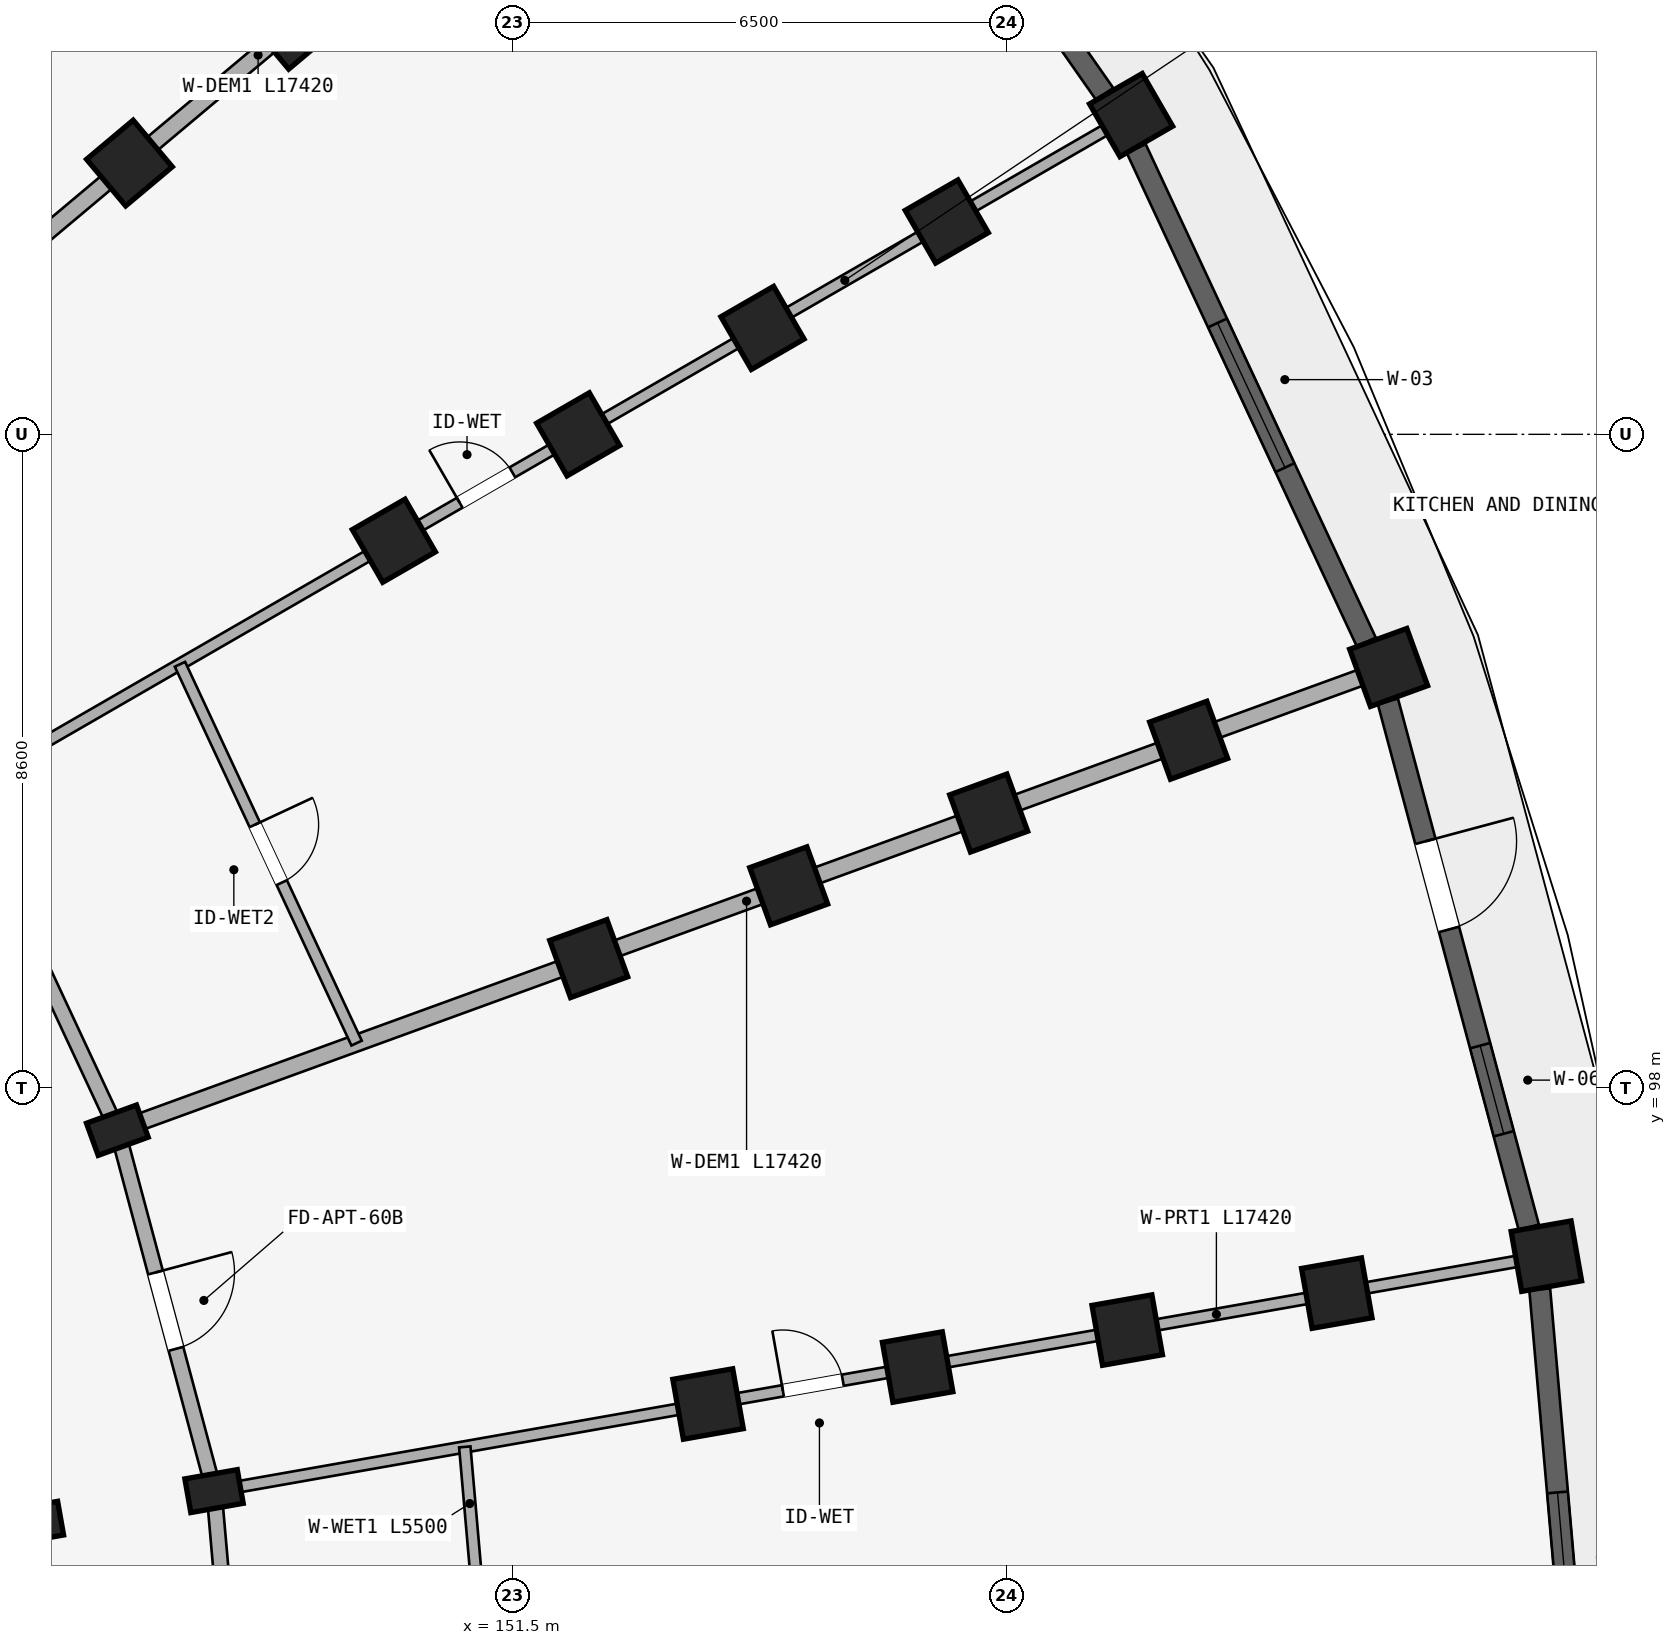
"""IFC4 building model, lengths in metres.
Left out: names, types, materials, properties, quantities, classifications, styles, units other than length and angle.
Written with IfcOpenShell. Run it as: python <this file> out.ifc"""

import sys

from ifc_helpers import new_model, si_unit, direction, frame, frame_2d, origin, origin_2d, place, context, subcontext, project, spatial, rectangle, extrude, element, fill, save


model = new_model("IFC4")
c1 = context("Model", 3, precision=1e-05, world=origin(), true_north=direction((0.0, 1.0)))
c2 = subcontext(c1, "Body", "Model", "MODEL_VIEW")
j1 = project(units=[si_unit("LENGTHUNIT", "METRE"), si_unit("PLANEANGLEUNIT", "RADIAN")], contexts=[c1])
p1 = place(None, origin())
s1 = spatial("IfcSite", under=j1, at=p1, CompositionType="ELEMENT")
p2 = place(p1, origin())
s2 = spatial("IfcBuilding", under=s1, at=p2, CompositionType="ELEMENT")
p3 = place(p2, frame((0.0, 0.0, 15.0)))
s3 = spatial("IfcBuildingStorey", under=s2, at=p3, CompositionType="ELEMENT", Elevation=15.0)
for number, where, z_axis, x_axis in (
    (1, (146.458, 110.169, 0.0), (0.0, 0.0, 1.0), (-0.643, 0.766, 0.0)),
    (2, (148.603, 111.969, 0.0), (0.0, 0.0, 1.0), (-0.643, 0.766, 0.0)),
    (3, (149.938, 105.2, 0.0), (0.0, 0.0, 1.0), (-0.5, 0.866, 0.0)),
    (4, (152.363, 106.6, 0.0), (0.0, 0.0, 1.0), (-0.5, 0.866, 0.0)),
    (5, (154.787, 108.0, 0.0), (0.0, 0.0, 1.0), (-0.5, 0.866, 0.0)),
    (6, (157.212, 109.4, 0.0), (0.0, 0.0, 1.0), (-0.5, 0.866, 0.0)),
    (7, (159.637, 110.8, 0.0), (0.0, 0.0, 1.0), (-0.5, 0.866, 0.0)),
):
    element("IfcColumn", number, at=place(p3, frame(where, z_axis=z_axis, x_axis=x_axis)), inside=s3, PredefinedType="COLUMN", context=c2, shape_type="SweptSolid", body=[
        extrude(rectangle(XDim=0.8, YDim=0.8, at=origin_2d()), origin(), (0.0, 0.0, 1.0), 2.93),
    ])
p4 = place(p3, frame((146.299, 97.445, 0.0), z_axis=(0.0, 0.0, 1.0), x_axis=(-0.342020143326, 0.939692620786, 0.0)))
e8 = element("IfcColumn", 8, at=p4, inside=s3, PredefinedType="COLUMN", context=c2, shape_type="SweptSolid", body=[
    extrude(rectangle(XDim=0.45, YDim=0.7, at=origin_2d()), origin(), (0.0, 0.0, 1.0), 2.93),
])
for number, where, z_axis, x_axis in (
    (9, (152.501, 99.702, 0.0), (0.0, 0.0, 1.0), (-0.342, 0.94, 0.0)),
    (10, (155.132, 100.66, 0.0), (0.0, 0.0, 1.0), (-0.342, 0.94, 0.0)),
    (11, (157.764, 101.618, 0.0), (0.0, 0.0, 1.0), (-0.342, 0.94, 0.0)),
    (12, (160.395, 102.575, 0.0), (0.0, 0.0, 1.0), (-0.342, 0.94, 0.0)),
    (13, (163.026, 103.533, 0.0), (0.0, 0.0, 1.0), (-0.342, 0.94, 0.0)),
):
    element("IfcColumn", number, at=place(p3, frame(where, z_axis=z_axis, x_axis=x_axis)), inside=s3, PredefinedType="COLUMN", context=c2, shape_type="SweptSolid", body=[
        extrude(rectangle(XDim=0.8, YDim=0.8, at=origin_2d()), origin(), (0.0, 0.0, 1.0), 2.93),
    ])
for number, where, z_axis, x_axis in (
    (14, (145.208, 92.28, 0.0), (0.0, 0.0, 1.0), (-0.174, 0.985, 0.0)),
    (15, (147.572, 92.697, 0.0), (0.0, 0.0, 1.0), (-0.174, 0.985, 0.0)),
):
    element("IfcColumn", number, at=place(p3, frame(where, z_axis=z_axis, x_axis=x_axis)), inside=s3, PredefinedType="COLUMN", context=c2, shape_type="SweptSolid", body=[
        extrude(rectangle(XDim=0.45, YDim=0.7, at=origin_2d()), origin(), (0.0, 0.0, 1.0), 2.93),
    ])
for number, where, z_axis, x_axis in (
    (16, (154.071, 93.843, 0.0), (0.0, 0.0, 1.0), (-0.174, 0.985, 0.0)),
    (17, (156.829, 94.329, 0.0), (0.0, 0.0, 1.0), (-0.174, 0.985, 0.0)),
    (18, (159.586, 94.815, 0.0), (0.0, 0.0, 1.0), (-0.174, 0.985, 0.0)),
    (19, (162.344, 95.302, 0.0), (0.0, 0.0, 1.0), (-0.174, 0.985, 0.0)),
    (20, (165.101, 95.788, 0.0), (0.0, 0.0, 1.0), (-0.174, 0.985, 0.0)),
):
    element("IfcColumn", number, at=place(p3, frame(where, z_axis=z_axis, x_axis=x_axis)), inside=s3, PredefinedType="COLUMN", context=c2, shape_type="SweptSolid", body=[
        extrude(rectangle(XDim=0.8, YDim=0.8, at=origin_2d()), origin(), (0.0, 0.0, 1.0), 2.93),
    ])
p5 = place(p3, frame((144.222, 101.9, 0.0), z_axis=(0.0, 0.0, 1.0), x_axis=(0.422629854778, -0.906302381024, 0.0)))
e21 = element("IfcWall", 21, at=p5, inside=s3, PredefinedType="STANDARD", context=c2, shape_type="SweptSolid", body=[
    extrude(rectangle(XDim=4.915, YDim=0.2, at=frame_2d((2.458, 0.0))), origin(), (0.0, 0.0, 1.0), 2.372),
])
p6 = place(p3, frame((146.299, 97.445, 0.0), z_axis=(0.0, 0.0, 1.0), x_axis=(0.258803112091, -0.965930095386, 0.0)))
e22 = element("IfcWall", 22, at=p6, inside=s3, PredefinedType="STANDARD", context=c2, shape_type="SweptSolid", body=[
    extrude(rectangle(XDim=4.916, YDim=0.2, at=frame_2d((2.458, 0.0))), origin(), (0.0, 0.0, 1.0), 2.372),
])
p7 = place(p6, frame((1.938, 0.0, 0.0)))
e23 = element("IfcOpeningElement", 23, at=p7, cuts=e22, PredefinedType="OPENING", context=c2, shape_type="SweptSolid", body=[
    extrude(rectangle(XDim=1.04, YDim=2.15, at=frame_2d((0.52, 1.075))), frame((0.0, 0.11, 0.0), z_axis=(0.0, -1.0, 0.0), x_axis=(1.0, 0.0, 0.0)), (0.0, 0.0, 1.0), 0.22),
])
p8 = place(p3, frame((145.208, 92.28, 0.0), z_axis=(0.0, 0.0, 1.0), x_axis=(0.087187153726, -0.996191949488, 0.0)))
e24 = element("IfcWall", 24, at=p8, inside=s3, PredefinedType="STANDARD", context=c2, shape_type="SweptSolid", body=[
    extrude(rectangle(XDim=4.497, YDim=0.2, at=frame_2d((2.249, 0.0))), origin(), (0.0, 0.0, 1.0), 2.372),
])
p9 = place(p3, frame((147.572, 92.697, 0.0), z_axis=(0.0, 0.0, 1.0), x_axis=(0.087167566415, -0.996193663584, 0.0)))
e25 = element("IfcWall", 25, at=p9, inside=s3, PredefinedType="STANDARD", context=c2, shape_type="SweptSolid", body=[
    extrude(rectangle(XDim=4.916, YDim=0.2, at=frame_2d((2.458, 0.0))), origin(), (0.0, 0.0, 1.0), 2.372),
])
p10 = place(p3, frame((137.991, 109.479, 0.0), z_axis=(0.0, 0.0, 1.0), x_axis=(0.642784757967, 0.766046835987, 0.0)))
e26 = element("IfcWall", 26, at=p10, inside=s3, PredefinedType="PARTITIONING", context=c2, shape_type="SweptSolid", body=[
    extrude(rectangle(XDim=17.42, YDim=0.15, at=frame_2d((8.71, 0.0))), origin(), (0.0, 0.0, 1.0), 2.372),
])
p11 = place(p10, frame((7.5, 0.0, 0.0)))
e27 = element("IfcOpeningElement", 27, at=p11, cuts=e26, PredefinedType="OPENING", context=c2, shape_type="SweptSolid", body=[
    extrude(rectangle(XDim=0.8, YDim=2.1, at=frame_2d((0.4, 1.05))), frame((0.0, 0.085, 0.0), z_axis=(0.0, -1.0, 0.0), x_axis=(1.0, 0.0, 0.0)), (0.0, 0.0, 1.0), 0.17),
])
p12 = place(p3, frame((141.479, 105.991, 0.0), z_axis=(0.0, 0.0, 1.0), x_axis=(0.766046835987, 0.642784757967, 0.0)))
e28 = element("IfcWall", 28, at=p12, inside=s3, PredefinedType="STANDARD", context=c2, shape_type="SweptSolid", body=[
    extrude(rectangle(XDim=17.42, YDim=0.22, at=frame_2d((8.71, 0.0))), origin(), (0.0, 0.0, 1.0), 2.372),
])
p13 = place(p3, frame((144.309, 101.95, 0.0), z_axis=(0.0, 0.0, 1.0), x_axis=(0.866026648973, 0.499997843263, 0.0)))
e29 = element("IfcWall", 29, at=p13, inside=s3, PredefinedType="PARTITIONING", context=c2, shape_type="SweptSolid", body=[
    extrude(rectangle(XDim=17.42, YDim=0.15, at=frame_2d((8.71, 0.0))), origin(), (0.0, 0.0, 1.0), 2.372),
])
p14 = place(p13, frame((7.5, 0.0, 0.0)))
e30 = element("IfcOpeningElement", 30, at=p14, cuts=e29, PredefinedType="OPENING", context=c2, shape_type="SweptSolid", body=[
    extrude(rectangle(XDim=0.8, YDim=2.1, at=frame_2d((0.4, 1.05))), frame((0.0, 0.085, 0.0), z_axis=(0.0, -1.0, 0.0), x_axis=(1.0, 0.0, 0.0)), (0.0, 0.0, 1.0), 0.17),
])
p15 = place(p3, frame((146.393, 97.479, 0.0), z_axis=(0.0, 0.0, 1.0), x_axis=(0.939691901159, 0.342022120477, 0.0)))
e31 = element("IfcWall", 31, at=p15, inside=s3, PredefinedType="STANDARD", context=c2, shape_type="SweptSolid", body=[
    extrude(rectangle(XDim=17.42, YDim=0.22, at=frame_2d((8.71, 0.0))), origin(), (0.0, 0.0, 1.0), 2.372),
])
p16 = place(p3, frame((147.67, 92.714, 0.0), z_axis=(0.0, 0.0, 1.0), x_axis=(0.984808098809, 0.173646216546, 0.0)))
e32 = element("IfcWall", 32, at=p16, inside=s3, PredefinedType="PARTITIONING", context=c2, shape_type="SweptSolid", body=[
    extrude(rectangle(XDim=17.42, YDim=0.15, at=frame_2d((8.71, 0.0))), origin(), (0.0, 0.0, 1.0), 2.372),
])
p17 = place(p16, frame((7.5, 0.0, 0.0)))
e33 = element("IfcOpeningElement", 33, at=p17, cuts=e32, PredefinedType="OPENING", context=c2, shape_type="SweptSolid", body=[
    extrude(rectangle(XDim=0.8, YDim=2.1, at=frame_2d((0.4, 1.05))), frame((0.0, 0.085, 0.0), z_axis=(0.0, -1.0, 0.0), x_axis=(1.0, 0.0, 0.0)), (0.0, 0.0, 1.0), 0.17),
])
p18 = place(p3, frame((147.123, 103.575, 0.0), z_axis=(0.0, 0.0, 1.0), x_axis=(0.422630264446, -0.906302189986, 0.0)))
e34 = element("IfcWall", 34, at=p18, inside=s3, PredefinedType="PLUMBINGWALL", context=c2, shape_type="SweptSolid", body=[
    extrude(rectangle(XDim=5.5, YDim=0.15, at=frame_2d((2.75, 0.0))), origin(), (0.0, 0.0, 1.0), 2.372),
])
p19 = place(p18, frame((2.33, 0.0, 0.0)))
e35 = element("IfcOpeningElement", 35, at=p19, cuts=e34, PredefinedType="OPENING", context=c2, shape_type="SweptSolid", body=[
    extrude(rectangle(XDim=0.84, YDim=2.1, at=frame_2d((0.42, 1.05))), frame((0.0, 0.085, 0.0), z_axis=(0.0, -1.0, 0.0), x_axis=(1.0, 0.0, 0.0)), (0.0, 0.0, 1.0), 0.17),
])
p20 = place(p3, frame((150.871, 93.279, 0.0), z_axis=(0.0, 0.0, 1.0), x_axis=(0.087188978393, -0.996191789791, 0.0)))
e36 = element("IfcWall", 36, at=p20, inside=s3, PredefinedType="PLUMBINGWALL", context=c2, shape_type="SweptSolid", body=[
    extrude(rectangle(XDim=5.5, YDim=0.15, at=frame_2d((2.75, 0.0))), origin(), (0.0, 0.0, 1.0), 2.372),
])
p21 = place(p20, frame((2.35, 0.0, 0.0)))
e37 = element("IfcOpeningElement", 37, at=p21, cuts=e36, PredefinedType="OPENING", context=c2, shape_type="SweptSolid", body=[
    extrude(rectangle(XDim=0.8, YDim=2.1, at=frame_2d((0.4, 1.05))), frame((0.0, 0.085, 0.0), z_axis=(0.0, -1.0, 0.0), x_axis=(1.0, 0.0, 0.0)), (0.0, 0.0, 1.0), 0.17),
])
p22 = place(p3, frame((155.181, 116.947, 0.0), z_axis=(0.0, 0.0, 1.0), x_axis=(0.573562972382, -0.819161471697, 0.0)))
e38 = element("IfcWall", 38, at=p22, inside=s3, PredefinedType="STANDARD", context=c2, shape_type="SweptSolid", body=[
    extrude(rectangle(XDim=7.164, YDim=0.275, at=frame_2d((3.582, 0.0))), origin(), (0.0, 0.0, 1.0), 2.472),
])
p23 = place(p22, frame((2.457, 0.0, 0.322)))
e39 = element("IfcOpeningElement", 39, at=p23, cuts=e38, PredefinedType="OPENING", context=c2, shape_type="SweptSolid", body=[
    extrude(rectangle(XDim=2.25, YDim=1.95, at=frame_2d((1.125, 0.975))), frame((0.0, 0.147, 0.0), z_axis=(0.0, -1.0, 0.0), x_axis=(1.0, 0.0, 0.0)), (0.0, 0.0, 1.0), 0.295),
])
p24 = place(p3, frame((159.704, 110.36, 0.0), z_axis=(0.0, 0.0, 1.0), x_axis=(0.422633596215, -0.906300636296, 0.0)))
e40 = element("IfcWall", 40, at=p24, inside=s3, PredefinedType="STANDARD", context=c2, shape_type="SweptSolid", body=[
    extrude(rectangle(XDim=7.164, YDim=0.275, at=frame_2d((3.582, 0.0))), origin(), (0.0, 0.0, 1.0), 2.472),
])
p25 = place(p24, frame((2.532, 0.0, 0.472)))
e41 = element("IfcOpeningElement", 41, at=p25, cuts=e40, PredefinedType="OPENING", context=c2, shape_type="SweptSolid", body=[
    extrude(rectangle(XDim=2.1, YDim=1.8, at=frame_2d((1.05, 0.9))), frame((0.0, 0.147, 0.0), z_axis=(0.0, -1.0, 0.0), x_axis=(1.0, 0.0, 0.0)), (0.0, 0.0, 1.0), 0.295),
])
p26 = place(p3, frame((163.016, 103.088, 0.0), z_axis=(0.0, 0.0, 1.0), x_axis=(0.258826933296, -0.965923712619, 0.0)))
e42 = element("IfcWall", 42, at=p26, inside=s3, PredefinedType="STANDARD", context=c2, shape_type="SweptSolid", body=[
    extrude(rectangle(XDim=7.164, YDim=0.275, at=frame_2d((3.582, 0.0))), origin(), (0.0, 0.0, 1.0), 2.472),
])
p27 = place(p26, frame((4.69, 0.0, 0.422)))
e43 = element("IfcOpeningElement", 43, at=p27, cuts=e42, PredefinedType="OPENING", context=c2, shape_type="SweptSolid", body=[
    extrude(rectangle(XDim=1.2, YDim=1.5, at=frame_2d((0.6, 0.75))), frame((0.0, 0.147, 0.0), z_axis=(0.0, -1.0, 0.0), x_axis=(1.0, 0.0, 0.0)), (0.0, 0.0, 1.0), 0.295),
])
p28 = place(p26, frame((1.907, 0.0, 0.0)))
e44 = element("IfcOpeningElement", 44, at=p28, cuts=e42, PredefinedType="OPENING", context=c2, shape_type="SweptSolid", body=[
    extrude(rectangle(XDim=1.2, YDim=2.15, at=frame_2d((0.6, 1.075))), frame((0.0, 0.147, 0.0), z_axis=(0.0, -1.0, 0.0), x_axis=(1.0, 0.0, 0.0)), (0.0, 0.0, 1.0), 0.295),
])
p29 = place(p3, frame((165.014, 95.351, 0.0), z_axis=(0.0, 0.0, 1.0), x_axis=(0.08713989423, -0.99619608453, 0.0)))
e45 = element("IfcWall", 45, at=p29, inside=s3, PredefinedType="STANDARD", context=c2, shape_type="SweptSolid", body=[
    extrude(rectangle(XDim=7.164, YDim=0.275, at=frame_2d((3.582, 0.0))), origin(), (0.0, 0.0, 1.0), 2.472),
])
p30 = place(p29, frame((2.682, 0.0, 0.622)))
e46 = element("IfcOpeningElement", 46, at=p30, cuts=e45, PredefinedType="OPENING", context=c2, shape_type="SweptSolid", body=[
    extrude(rectangle(XDim=1.8, YDim=1.65, at=frame_2d((0.9, 0.825))), frame((0.0, 0.147, 0.0), z_axis=(0.0, -1.0, 0.0), x_axis=(1.0, 0.0, 0.0)), (0.0, 0.0, 1.0), 0.295),
])
p31 = place(p25, origin())
e47 = element("IfcWindow", 47, at=p31, inside=s3, PartitioningType="TRIPLE_PANEL_VERTICAL", PredefinedType="WINDOW", context=c2, shape_type="SweptSolid", body=[
    extrude(rectangle(XDim=2.1, YDim=1.8, at=frame_2d((1.05, 0.9))), frame((0.0, 0.03, 0.0), z_axis=(0.0, -1.0, 0.0), x_axis=(1.0, 0.0, 0.0)), (0.0, 0.0, 1.0), 0.06),
])
fill(e41, e47)
p32 = place(p27, origin())
e48 = element("IfcWindow", 48, at=p32, inside=s3, PartitioningType="SINGLE_PANEL", PredefinedType="WINDOW", context=c2, shape_type="SweptSolid", body=[
    extrude(rectangle(XDim=1.2, YDim=1.5, at=frame_2d((0.6, 0.75))), frame((0.0, 0.03, 0.0), z_axis=(0.0, -1.0, 0.0), x_axis=(1.0, 0.0, 0.0)), (0.0, 0.0, 1.0), 0.06),
])
fill(e43, e48)
p33 = place(p30, origin())
e49 = element("IfcWindow", 49, at=p33, inside=s3, PartitioningType="DOUBLE_PANEL_VERTICAL", PredefinedType="WINDOW", context=c2, shape_type="SweptSolid", body=[
    extrude(rectangle(XDim=1.8, YDim=1.65, at=frame_2d((0.9, 0.825))), frame((0.0, 0.03, 0.0), z_axis=(0.0, -1.0, 0.0), x_axis=(1.0, 0.0, 0.0)), (0.0, 0.0, 1.0), 0.06),
])
fill(e46, e49)
p34 = place(p14, frame((0.8, 0.0, 0.0), z_axis=(0.0, 0.0, 1.0), x_axis=(-1.0, 0.0, 0.0)))
e50 = element("IfcDoor", 50, at=p34, inside=s3, OperationType="SINGLE_SWING_RIGHT", PredefinedType="DOOR", context=c2, shape_type="SweptSolid", body=[
    extrude(rectangle(XDim=0.8, YDim=2.1, at=frame_2d((0.4, 1.05))), frame((0.0, 0.025, 0.0), z_axis=(0.0, -1.0, 0.0), x_axis=(1.0, 0.0, 0.0)), (0.0, 0.0, 1.0), 0.05),
])
fill(e30, e50)
p35 = place(p17, origin())
e51 = element("IfcDoor", 51, at=p35, inside=s3, OperationType="SINGLE_SWING_LEFT", PredefinedType="DOOR", context=c2, shape_type="SweptSolid", body=[
    extrude(rectangle(XDim=0.8, YDim=2.1, at=frame_2d((0.4, 1.05))), frame((0.0, 0.025, 0.0), z_axis=(0.0, -1.0, 0.0), x_axis=(1.0, 0.0, 0.0)), (0.0, 0.0, 1.0), 0.05),
])
fill(e33, e51)
p36 = place(p19, origin())
e52 = element("IfcDoor", 52, at=p36, inside=s3, OperationType="SINGLE_SWING_LEFT", PredefinedType="DOOR", context=c2, shape_type="SweptSolid", body=[
    extrude(rectangle(XDim=0.84, YDim=2.1, at=frame_2d((0.42, 1.05))), frame((0.0, 0.025, 0.0), z_axis=(0.0, -1.0, 0.0), x_axis=(1.0, 0.0, 0.0)), (0.0, 0.0, 1.0), 0.05),
])
fill(e35, e52)
p37 = place(p7, frame((1.04, 0.0, 0.0), z_axis=(0.0, 0.0, 1.0), x_axis=(-1.0, 0.0, 0.0)))
e53 = element("IfcDoor", 53, at=p37, inside=s3, OperationType="SINGLE_SWING_RIGHT", PredefinedType="DOOR", context=c2, shape_type="SweptSolid", body=[
    extrude(rectangle(XDim=1.04, YDim=2.15, at=frame_2d((0.52, 1.075))), frame((0.0, 0.025, 0.0), z_axis=(0.0, -1.0, 0.0), x_axis=(1.0, 0.0, 0.0)), (0.0, 0.0, 1.0), 0.05),
])
fill(e23, e53)
p38 = place(p28, origin())
e54 = element("IfcDoor", 54, at=p38, inside=s3, OperationType="SINGLE_SWING_LEFT", PredefinedType="DOOR", context=c2, shape_type="SweptSolid", body=[
    extrude(rectangle(XDim=1.2, YDim=2.15, at=frame_2d((0.6, 1.075))), frame((0.0, 0.025, 0.0), z_axis=(0.0, -1.0, 0.0), x_axis=(1.0, 0.0, 0.0)), (0.0, 0.0, 1.0), 0.05),
])
fill(e44, e54)
save(model, sys.argv[1])
